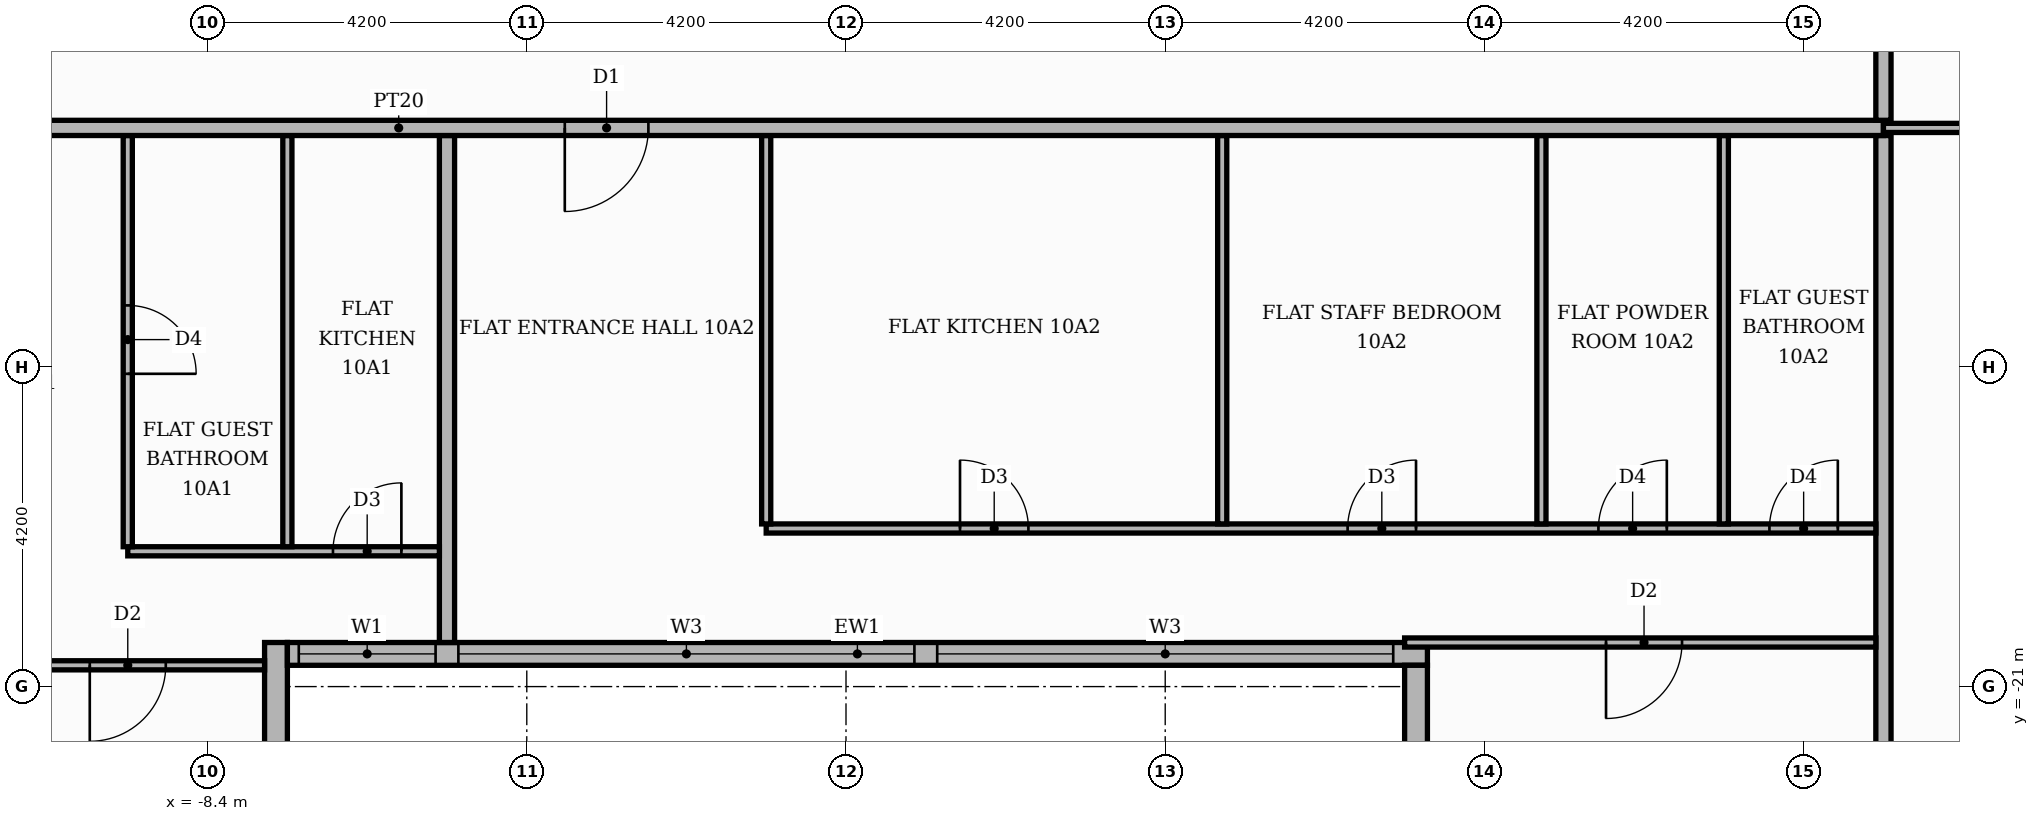
"""IFC4 building model, lengths in metres.
Left out: names, types, materials, properties, quantities, classifications, styles, units other than length and angle.
Written with IfcOpenShell. Run it as: python <this file> out.ifc"""

import sys

from ifc_helpers import new_model, si_unit, direction, frame, frame_2d, origin, place, context, subcontext, project, spatial, rectangle, extrude, element, fill, save


model = new_model("IFC4")
c1 = context("Model", 3, precision=1e-05, world=origin(), true_north=direction((0.0, 1.0)))
c2 = subcontext(c1, "Body", "Model", "MODEL_VIEW")
j1 = project(units=[si_unit("LENGTHUNIT", "METRE"), si_unit("PLANEANGLEUNIT", "RADIAN")], contexts=[c1])
p1 = place(None, origin())
s1 = spatial("IfcSite", under=j1, at=p1, CompositionType="ELEMENT")
p2 = place(p1, origin())
s2 = spatial("IfcBuilding", under=s1, at=p2, CompositionType="ELEMENT")
p3 = place(p2, frame((0.0, 0.0, 46.5)))
s3 = spatial("IfcBuildingStorey", under=s2, at=p3, CompositionType="ELEMENT", Elevation=46.5)
p4 = place(p3, frame((-7.5, -25.42, 0.0), z_axis=(0.0, 0.0, 1.0), x_axis=(0.0, 1.0, 0.0)))
e1 = element("IfcWall", 1, at=p4, inside=s3, PredefinedType="STANDARD", context=c2, shape_type="SweptSolid", body=[
    extrude(rectangle(XDim=5.0, YDim=0.3, at=frame_2d((2.5, 0.0))), origin(), (0.0, 0.0, 1.0), 3.48),
])
p5 = place(p4, frame((1.42, 0.0, 0.9)))
e2 = element("IfcOpeningElement", 2, at=p5, cuts=e1, PredefinedType="OPENING", context=c2, shape_type="SweptSolid", body=[
    extrude(rectangle(XDim=1.8, YDim=2.1, at=frame_2d((0.9, 1.05))), frame((0.0, 0.16, 0.0), z_axis=(0.0, -1.0, 0.0), x_axis=(1.0, 0.0, 0.0)), (0.0, 0.0, 1.0), 0.32),
])
p6 = place(p3, frame((-7.35, -20.57, 0.0), z_axis=(0.0, 0.0, 1.0), x_axis=(1.0, 0.0, 0.0)))
e3 = element("IfcWall", 3, at=p6, inside=s3, PredefinedType="STANDARD", context=c2, shape_type="SweptSolid", body=[
    extrude(rectangle(XDim=15.0, YDim=0.3, at=frame_2d((7.5, 0.0))), origin(), (0.0, 0.0, 1.0), 3.48),
])
p7 = place(p6, frame((0.15, 0.0, 0.9)))
e4 = element("IfcOpeningElement", 4, at=p7, cuts=e3, PredefinedType="OPENING", context=c2, shape_type="SweptSolid", body=[
    extrude(rectangle(XDim=1.8, YDim=2.1, at=frame_2d((0.9, 1.05))), frame((0.0, 0.16, 0.0), z_axis=(0.0, -1.0, 0.0), x_axis=(1.0, 0.0, 0.0)), (0.0, 0.0, 1.0), 0.32),
])
p8 = place(p6, frame((2.25, 0.0, 0.9)))
e5 = element("IfcOpeningElement", 5, at=p8, cuts=e3, PredefinedType="OPENING", context=c2, shape_type="SweptSolid", body=[
    extrude(rectangle(XDim=6.0, YDim=2.1, at=frame_2d((3.0, 1.05))), frame((0.0, 0.16, 0.0), z_axis=(0.0, -1.0, 0.0), x_axis=(1.0, 0.0, 0.0)), (0.0, 0.0, 1.0), 0.32),
])
p9 = place(p6, frame((8.55, 0.0, 0.9)))
e6 = element("IfcOpeningElement", 6, at=p9, cuts=e3, PredefinedType="OPENING", context=c2, shape_type="SweptSolid", body=[
    extrude(rectangle(XDim=6.0, YDim=2.1, at=frame_2d((3.0, 1.05))), frame((0.0, 0.16, 0.0), z_axis=(0.0, -1.0, 0.0), x_axis=(1.0, 0.0, 0.0)), (0.0, 0.0, 1.0), 0.32),
])
p10 = place(p3, frame((7.5, -20.72, 0.0), z_axis=(0.0, 0.0, 1.0), x_axis=(0.0, -1.0, 0.0)))
e7 = element("IfcWall", 7, at=p10, inside=s3, PredefinedType="STANDARD", context=c2, shape_type="SweptSolid", body=[
    extrude(rectangle(XDim=5.0, YDim=0.3, at=frame_2d((2.5, 0.0))), origin(), (0.0, 0.0, 1.0), 3.48),
])
p11 = place(p10, frame((1.48, 0.0, 0.9)))
e8 = element("IfcOpeningElement", 8, at=p11, cuts=e7, PredefinedType="OPENING", context=c2, shape_type="SweptSolid", body=[
    extrude(rectangle(XDim=1.8, YDim=2.1, at=frame_2d((0.9, 1.05))), frame((0.0, 0.16, 0.0), z_axis=(0.0, -1.0, 0.0), x_axis=(1.0, 0.0, 0.0)), (0.0, 0.0, 1.0), 0.32),
])
p12 = place(p3, frame((13.65, -25.42, 0.0), z_axis=(0.0, 0.0, 1.0), x_axis=(0.0, 1.0, 0.0)))
e9 = element("IfcWall", 9, at=p12, inside=s3, PredefinedType="PARTITIONING", context=c2, shape_type="SweptSolid", body=[
    extrude(rectangle(XDim=11.67, YDim=0.2, at=frame_2d((5.835, 0.0))), origin(), (0.0, 0.0, 1.0), 3.48),
])
p13 = place(p3, frame((-25.42, -20.72, 0.0), z_axis=(0.0, 0.0, 1.0), x_axis=(1.0, 0.0, 0.0)))
e10 = element("IfcWall", 10, at=p13, inside=s3, PredefinedType="PARTITIONING", context=c2, shape_type="SweptSolid", body=[
    extrude(rectangle(XDim=17.77, YDim=0.12, at=frame_2d((8.885, 0.0))), origin(), (0.0, 0.0, 1.0), 3.48),
])
p14 = place(p13, frame((11.27, 0.0, 0.0)))
e11 = element("IfcOpeningElement", 11, at=p14, cuts=e10, PredefinedType="OPENING", context=c2, shape_type="SweptSolid", body=[
    extrude(rectangle(XDim=1.0, YDim=2.1, at=frame_2d((0.5, 1.05))), frame((0.0, 0.07, 0.0), z_axis=(0.0, -1.0, 0.0), x_axis=(1.0, 0.0, 0.0)), (0.0, 0.0, 1.0), 0.14),
])
p15 = place(p13, frame((15.47, 0.0, 0.0)))
e12 = element("IfcOpeningElement", 12, at=p15, cuts=e10, PredefinedType="OPENING", context=c2, shape_type="SweptSolid", body=[
    extrude(rectangle(XDim=1.0, YDim=2.1, at=frame_2d((0.5, 1.05))), frame((0.0, 0.07, 0.0), z_axis=(0.0, -1.0, 0.0), x_axis=(1.0, 0.0, 0.0)), (0.0, 0.0, 1.0), 0.14),
])
p16 = place(p3, frame((-5.25, -20.42, 0.0), z_axis=(0.0, 0.0, 1.0), x_axis=(0.0, 1.0, 0.0)))
e13 = element("IfcWall", 13, at=p16, inside=s3, PredefinedType="PARTITIONING", context=c2, shape_type="SweptSolid", body=[
    extrude(rectangle(XDim=6.67, YDim=0.2, at=frame_2d((3.335, 0.0))), origin(), (0.0, 0.0, 1.0), 3.48),
])
p17 = place(p3, frame((7.35, -20.42, 0.0), z_axis=(0.0, 0.0, 1.0), x_axis=(1.0, 0.0, 0.0)))
e14 = element("IfcWall", 14, at=p17, inside=s3, PredefinedType="PARTITIONING", context=c2, shape_type="SweptSolid", body=[
    extrude(rectangle(XDim=6.2, YDim=0.12, at=frame_2d((3.1, 0.0))), origin(), (0.0, 0.0, 1.0), 3.48),
])
p18 = place(p17, frame((2.65, 0.0, 0.0)))
e15 = element("IfcOpeningElement", 15, at=p18, cuts=e14, PredefinedType="OPENING", context=c2, shape_type="SweptSolid", body=[
    extrude(rectangle(XDim=1.0, YDim=2.1, at=frame_2d((0.5, 1.05))), frame((0.0, 0.07, 0.0), z_axis=(0.0, -1.0, 0.0), x_axis=(1.0, 0.0, 0.0)), (0.0, 0.0, 1.0), 0.14),
])
p19 = place(p3, frame((-9.45, -19.22, 0.0), z_axis=(0.0, 0.0, 1.0), x_axis=(1.0, 0.0, 0.0)))
e16 = element("IfcWall", 16, at=p19, inside=s3, PredefinedType="PARTITIONING", context=c2, shape_type="SweptSolid", body=[
    extrude(rectangle(XDim=4.1, YDim=0.12, at=frame_2d((2.05, 0.0))), origin(), (0.0, 0.0, 1.0), 3.48),
])
p20 = place(p19, frame((2.7, 0.0, 0.0)))
e17 = element("IfcOpeningElement", 17, at=p20, cuts=e16, PredefinedType="OPENING", context=c2, shape_type="SweptSolid", body=[
    extrude(rectangle(XDim=0.9, YDim=2.1, at=frame_2d((0.45, 1.05))), frame((0.0, 0.07, 0.0), z_axis=(0.0, -1.0, 0.0), x_axis=(1.0, 0.0, 0.0)), (0.0, 0.0, 1.0), 0.14),
])
p21 = place(p3, frame((-9.45, -19.16, 0.0), z_axis=(0.0, 0.0, 1.0), x_axis=(0.0, 1.0, 0.0)))
e18 = element("IfcWall", 18, at=p21, inside=s3, PredefinedType="PARTITIONING", context=c2, shape_type="SweptSolid", body=[
    extrude(rectangle(XDim=5.41, YDim=0.12, at=frame_2d((2.705, 0.0))), origin(), (0.0, 0.0, 1.0), 3.48),
])
p22 = place(p21, frame((2.275, 0.0, 0.0)))
e19 = element("IfcOpeningElement", 19, at=p22, cuts=e18, PredefinedType="OPENING", context=c2, shape_type="SweptSolid", body=[
    extrude(rectangle(XDim=0.9, YDim=2.1, at=frame_2d((0.45, 1.05))), frame((0.0, 0.07, 0.0), z_axis=(0.0, -1.0, 0.0), x_axis=(1.0, 0.0, 0.0)), (0.0, 0.0, 1.0), 0.14),
])
p23 = place(p3, frame((-7.35, -19.16, 0.0), z_axis=(0.0, 0.0, 1.0), x_axis=(0.0, 1.0, 0.0)))
e20 = element("IfcWall", 20, at=p23, inside=s3, PredefinedType="PARTITIONING", context=c2, shape_type="SweptSolid", body=[
    extrude(rectangle(XDim=5.41, YDim=0.12, at=frame_2d((2.705, 0.0))), origin(), (0.0, 0.0, 1.0), 3.48),
])
p24 = place(p3, frame((-1.05, -18.92, 0.0), z_axis=(0.0, 0.0, 1.0), x_axis=(1.0, 0.0, 0.0)))
e21 = element("IfcWall", 21, at=p24, inside=s3, PredefinedType="PARTITIONING", context=c2, shape_type="SweptSolid", body=[
    extrude(rectangle(XDim=14.6, YDim=0.12, at=frame_2d((7.3, 0.0))), origin(), (0.0, 0.0, 1.0), 3.48),
])
p25 = place(p24, frame((2.55, 0.0, 0.0)))
e22 = element("IfcOpeningElement", 22, at=p25, cuts=e21, PredefinedType="OPENING", context=c2, shape_type="SweptSolid", body=[
    extrude(rectangle(XDim=0.9, YDim=2.1, at=frame_2d((0.45, 1.05))), frame((0.0, 0.07, 0.0), z_axis=(0.0, -1.0, 0.0), x_axis=(1.0, 0.0, 0.0)), (0.0, 0.0, 1.0), 0.14),
])
p26 = place(p24, frame((7.65, 0.0, 0.0)))
e23 = element("IfcOpeningElement", 23, at=p26, cuts=e21, PredefinedType="OPENING", context=c2, shape_type="SweptSolid", body=[
    extrude(rectangle(XDim=0.9, YDim=2.1, at=frame_2d((0.45, 1.05))), frame((0.0, 0.07, 0.0), z_axis=(0.0, -1.0, 0.0), x_axis=(1.0, 0.0, 0.0)), (0.0, 0.0, 1.0), 0.14),
])
p27 = place(p24, frame((10.95, 0.0, 0.0)))
e24 = element("IfcOpeningElement", 24, at=p27, cuts=e21, PredefinedType="OPENING", context=c2, shape_type="SweptSolid", body=[
    extrude(rectangle(XDim=0.9, YDim=2.1, at=frame_2d((0.45, 1.05))), frame((0.0, 0.07, 0.0), z_axis=(0.0, -1.0, 0.0), x_axis=(1.0, 0.0, 0.0)), (0.0, 0.0, 1.0), 0.14),
])
p28 = place(p24, frame((13.2, 0.0, 0.0)))
e25 = element("IfcOpeningElement", 25, at=p28, cuts=e21, PredefinedType="OPENING", context=c2, shape_type="SweptSolid", body=[
    extrude(rectangle(XDim=0.9, YDim=2.1, at=frame_2d((0.45, 1.05))), frame((0.0, 0.07, 0.0), z_axis=(0.0, -1.0, 0.0), x_axis=(1.0, 0.0, 0.0)), (0.0, 0.0, 1.0), 0.14),
])
for number, where, z_axis, x_axis in (
    (26, (-1.05, -18.86, 0.0), (0.0, 0.0, 1.0), (0.0, 1.0, 0.0)),
    (27, (4.95, -18.86, 0.0), (0.0, 0.0, 1.0), (0.0, 1.0, 0.0)),
    (28, (9.15, -18.86, 0.0), (0.0, 0.0, 1.0), (0.0, 1.0, 0.0)),
    (29, (11.55, -18.86, 0.0), (0.0, 0.0, 1.0), (0.0, 1.0, 0.0)),
):
    element("IfcWall", number, at=place(p3, frame(where, z_axis=z_axis, x_axis=x_axis)), inside=s3, PredefinedType="PARTITIONING", context=c2, shape_type="SweptSolid", body=[
        extrude(rectangle(XDim=5.11, YDim=0.12, at=frame_2d((2.555, 0.0))), origin(), (0.0, 0.0, 1.0), 3.48),
    ])
p29 = place(p3, frame((-25.42, -13.65, 0.0), z_axis=(0.0, 0.0, 1.0), x_axis=(1.0, 0.0, 0.0)))
e30 = element("IfcWall", 30, at=p29, inside=s3, PredefinedType="PARTITIONING", context=c2, shape_type="SweptSolid", body=[
    extrude(rectangle(XDim=39.07, YDim=0.2, at=frame_2d((19.535, 0.0))), origin(), (0.0, 0.0, 1.0), 3.48),
])
p30 = place(p29, frame((13.32, 0.0, 0.0)))
e31 = element("IfcOpeningElement", 31, at=p30, cuts=e30, PredefinedType="OPENING", context=c2, shape_type="SweptSolid", body=[
    extrude(rectangle(XDim=1.1, YDim=2.4, at=frame_2d((0.55, 1.2))), frame((0.0, 0.11, 0.0), z_axis=(0.0, -1.0, 0.0), x_axis=(1.0, 0.0, 0.0)), (0.0, 0.0, 1.0), 0.22),
])
p31 = place(p29, frame((21.72, 0.0, 0.0)))
e32 = element("IfcOpeningElement", 32, at=p31, cuts=e30, PredefinedType="OPENING", context=c2, shape_type="SweptSolid", body=[
    extrude(rectangle(XDim=1.1, YDim=2.4, at=frame_2d((0.55, 1.2))), frame((0.0, 0.11, 0.0), z_axis=(0.0, -1.0, 0.0), x_axis=(1.0, 0.0, 0.0)), (0.0, 0.0, 1.0), 0.22),
])
p32 = place(p3, frame((13.65, -13.65, 0.0), z_axis=(0.0, 0.0, 1.0), x_axis=(1.0, 0.0, 0.0)))
e33 = element("IfcWall", 33, at=p32, inside=s3, PredefinedType="PARTITIONING", context=c2, shape_type="SweptSolid", body=[
    extrude(rectangle(XDim=6.77, YDim=0.12, at=frame_2d((3.385, 0.0))), origin(), (0.0, 0.0, 1.0), 3.48),
])
p33 = place(p32, frame((2.885, 0.0, 0.0)))
e34 = element("IfcOpeningElement", 34, at=p33, cuts=e33, PredefinedType="OPENING", context=c2, shape_type="SweptSolid", body=[
    extrude(rectangle(XDim=1.0, YDim=2.1, at=frame_2d((0.5, 1.05))), frame((0.0, 0.07, 0.0), z_axis=(0.0, -1.0, 0.0), x_axis=(1.0, 0.0, 0.0)), (0.0, 0.0, 1.0), 0.14),
])
p34 = place(p3, frame((13.65, -13.55, 0.0), z_axis=(0.0, 0.0, 1.0), x_axis=(0.0, 1.0, 0.0)))
e35 = element("IfcWall", 35, at=p34, inside=s3, PredefinedType="PARTITIONING", context=c2, shape_type="SweptSolid", body=[
    extrude(rectangle(XDim=27.1, YDim=0.2, at=frame_2d((13.55, 0.0))), origin(), (0.0, 0.0, 1.0), 3.48),
])
p35 = place(p34, frame((2.5, 0.0, 0.0)))
e36 = element("IfcOpeningElement", 36, at=p35, cuts=e35, PredefinedType="OPENING", context=c2, shape_type="SweptSolid", body=[
    extrude(rectangle(XDim=1.1, YDim=2.4, at=frame_2d((0.55, 1.2))), frame((0.0, 0.11, 0.0), z_axis=(0.0, -1.0, 0.0), x_axis=(1.0, 0.0, 0.0)), (0.0, 0.0, 1.0), 0.22),
])
p36 = place(p7, origin())
e37 = element("IfcWindow", 37, at=p36, inside=s3, PartitioningType="SINGLE_PANEL", PredefinedType="WINDOW", context=c2, shape_type="SweptSolid", body=[
    extrude(rectangle(XDim=1.8, YDim=2.1, at=frame_2d((0.9, 1.05))), frame((0.0, 0.03, 0.0), z_axis=(0.0, -1.0, 0.0), x_axis=(1.0, 0.0, 0.0)), (0.0, 0.0, 1.0), 0.06),
])
fill(e4, e37)
p37 = place(p8, origin())
e38 = element("IfcWindow", 38, at=p37, inside=s3, PartitioningType="SINGLE_PANEL", PredefinedType="WINDOW", context=c2, shape_type="SweptSolid", body=[
    extrude(rectangle(XDim=6.0, YDim=2.1, at=frame_2d((3.0, 1.05))), frame((0.0, 0.03, 0.0), z_axis=(0.0, -1.0, 0.0), x_axis=(1.0, 0.0, 0.0)), (0.0, 0.0, 1.0), 0.06),
])
fill(e5, e38)
p38 = place(p9, origin())
e39 = element("IfcWindow", 39, at=p38, inside=s3, PartitioningType="SINGLE_PANEL", PredefinedType="WINDOW", context=c2, shape_type="SweptSolid", body=[
    extrude(rectangle(XDim=6.0, YDim=2.1, at=frame_2d((3.0, 1.05))), frame((0.0, 0.03, 0.0), z_axis=(0.0, -1.0, 0.0), x_axis=(1.0, 0.0, 0.0)), (0.0, 0.0, 1.0), 0.06),
])
fill(e6, e39)
p39 = place(p22, frame((0.9, 0.0, 0.0), z_axis=(0.0, 0.0, 1.0), x_axis=(-1.0, 0.0, 0.0)))
e40 = element("IfcDoor", 40, at=p39, inside=s3, OperationType="SINGLE_SWING_LEFT", PredefinedType="DOOR", context=c2, shape_type="SweptSolid", body=[
    extrude(rectangle(XDim=0.9, YDim=2.1, at=frame_2d((0.45, 1.05))), frame((0.0, 0.025, 0.0), z_axis=(0.0, -1.0, 0.0), x_axis=(1.0, 0.0, 0.0)), (0.0, 0.0, 1.0), 0.05),
])
fill(e19, e40)
p40 = place(p20, origin())
e41 = element("IfcDoor", 41, at=p40, inside=s3, OperationType="SINGLE_SWING_RIGHT", PredefinedType="DOOR", context=c2, shape_type="SweptSolid", body=[
    extrude(rectangle(XDim=0.9, YDim=2.1, at=frame_2d((0.45, 1.05))), frame((0.0, 0.025, 0.0), z_axis=(0.0, -1.0, 0.0), x_axis=(1.0, 0.0, 0.0)), (0.0, 0.0, 1.0), 0.05),
])
fill(e17, e41)
p41 = place(p15, frame((1.0, 0.0, 0.0), z_axis=(0.0, 0.0, 1.0), x_axis=(-1.0, 0.0, 0.0)))
e42 = element("IfcDoor", 42, at=p41, inside=s3, OperationType="SINGLE_SWING_LEFT", PredefinedType="DOOR", context=c2, shape_type="SweptSolid", body=[
    extrude(rectangle(XDim=1.0, YDim=2.1, at=frame_2d((0.5, 1.05))), frame((0.0, 0.025, 0.0), z_axis=(0.0, -1.0, 0.0), x_axis=(1.0, 0.0, 0.0)), (0.0, 0.0, 1.0), 0.05),
])
fill(e12, e42)
p42 = place(p31, frame((1.1, 0.0, 0.0), z_axis=(0.0, 0.0, 1.0), x_axis=(-1.0, 0.0, 0.0)))
e43 = element("IfcDoor", 43, at=p42, inside=s3, OperationType="SINGLE_SWING_LEFT", PredefinedType="DOOR", context=c2, shape_type="SweptSolid", body=[
    extrude(rectangle(XDim=1.1, YDim=2.4, at=frame_2d((0.55, 1.2))), frame((0.0, 0.025, 0.0), z_axis=(0.0, -1.0, 0.0), x_axis=(1.0, 0.0, 0.0)), (0.0, 0.0, 1.0), 0.05),
])
fill(e32, e43)
p43 = place(p25, origin())
e44 = element("IfcDoor", 44, at=p43, inside=s3, OperationType="SINGLE_SWING_LEFT", PredefinedType="DOOR", context=c2, shape_type="SweptSolid", body=[
    extrude(rectangle(XDim=0.9, YDim=2.1, at=frame_2d((0.45, 1.05))), frame((0.0, 0.025, 0.0), z_axis=(0.0, -1.0, 0.0), x_axis=(1.0, 0.0, 0.0)), (0.0, 0.0, 1.0), 0.05),
])
fill(e22, e44)
p44 = place(p26, origin())
e45 = element("IfcDoor", 45, at=p44, inside=s3, OperationType="SINGLE_SWING_RIGHT", PredefinedType="DOOR", context=c2, shape_type="SweptSolid", body=[
    extrude(rectangle(XDim=0.9, YDim=2.1, at=frame_2d((0.45, 1.05))), frame((0.0, 0.025, 0.0), z_axis=(0.0, -1.0, 0.0), x_axis=(1.0, 0.0, 0.0)), (0.0, 0.0, 1.0), 0.05),
])
fill(e23, e45)
p45 = place(p27, origin())
e46 = element("IfcDoor", 46, at=p45, inside=s3, OperationType="SINGLE_SWING_RIGHT", PredefinedType="DOOR", context=c2, shape_type="SweptSolid", body=[
    extrude(rectangle(XDim=0.9, YDim=2.1, at=frame_2d((0.45, 1.05))), frame((0.0, 0.025, 0.0), z_axis=(0.0, -1.0, 0.0), x_axis=(1.0, 0.0, 0.0)), (0.0, 0.0, 1.0), 0.05),
])
fill(e24, e46)
p46 = place(p28, origin())
e47 = element("IfcDoor", 47, at=p46, inside=s3, OperationType="SINGLE_SWING_RIGHT", PredefinedType="DOOR", context=c2, shape_type="SweptSolid", body=[
    extrude(rectangle(XDim=0.9, YDim=2.1, at=frame_2d((0.45, 1.05))), frame((0.0, 0.025, 0.0), z_axis=(0.0, -1.0, 0.0), x_axis=(1.0, 0.0, 0.0)), (0.0, 0.0, 1.0), 0.05),
])
fill(e25, e47)
p47 = place(p18, frame((1.0, 0.0, 0.0), z_axis=(0.0, 0.0, 1.0), x_axis=(-1.0, 0.0, 0.0)))
e48 = element("IfcDoor", 48, at=p47, inside=s3, OperationType="SINGLE_SWING_LEFT", PredefinedType="DOOR", context=c2, shape_type="SweptSolid", body=[
    extrude(rectangle(XDim=1.0, YDim=2.1, at=frame_2d((0.5, 1.05))), frame((0.0, 0.025, 0.0), z_axis=(0.0, -1.0, 0.0), x_axis=(1.0, 0.0, 0.0)), (0.0, 0.0, 1.0), 0.05),
])
fill(e15, e48)
save(model, sys.argv[1])
